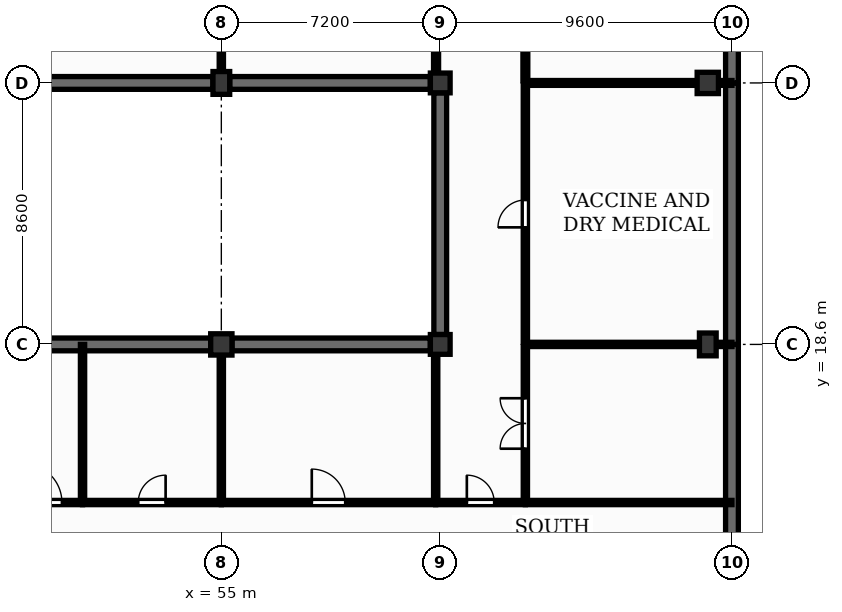
"""IFC4 building model, lengths in metres.
Left out: names, types, materials, properties, quantities, classifications, styles, units other than length and angle.
Written with IfcOpenShell. Run it as: python <this file> out.ifc"""

import sys

from ifc_helpers import new_model, si_unit, direction, frame, frame_2d, origin, origin_2d, place, context, subcontext, project, spatial, rectangle, extrude, element, fill, save


model = new_model("IFC4")
c1 = context("Model", 3, precision=1e-05, world=origin(), true_north=direction((0.0, 1.0)))
c2 = subcontext(c1, "Body", "Model", "MODEL_VIEW")
j1 = project(units=[si_unit("LENGTHUNIT", "METRE"), si_unit("PLANEANGLEUNIT", "RADIAN")], contexts=[c1])
p1 = place(None, origin())
s1 = spatial("IfcSite", under=j1, at=p1, CompositionType="ELEMENT")
p2 = place(p1, origin())
s2 = spatial("IfcBuilding", under=s1, at=p2, CompositionType="ELEMENT")
p3 = place(p2, frame((0.0, 0.0, -4.5)))
s3 = spatial("IfcBuildingStorey", under=s2, at=p3, CompositionType="ELEMENT", Elevation=-4.5)
p4 = place(p3, frame((55.0, 18.6, 0.0), z_axis=(0.0, 0.0, 1.0), x_axis=(1.0, 0.0, 0.0)))
e1 = element("IfcColumn", 1, at=p4, inside=s3, PredefinedType="COLUMN", context=c2, shape_type="SweptSolid", body=[
    extrude(rectangle(XDim=0.7, YDim=0.7, at=origin_2d()), origin(), (0.0, 0.0, 1.0), 4.2),
])
p5 = place(p3, frame((55.0, 27.2, 0.0), z_axis=(0.0, 0.0, 1.0), x_axis=(1.0, 0.0, 0.0)))
e2 = element("IfcColumn", 2, at=p5, inside=s3, PredefinedType="COLUMN", context=c2, shape_type="SweptSolid", body=[
    extrude(rectangle(XDim=0.55, YDim=0.75, at=origin_2d()), origin(), (0.0, 0.0, 1.0), 4.2),
])
for number, where, z_axis, x_axis in (
    (3, (62.2, 18.6, 0.0), (0.0, 0.0, 1.0), (1.0, 0.0, 0.0)),
    (4, (62.2, 27.2, 0.0), (0.0, 0.0, 1.0), (1.0, 0.0, 0.0)),
):
    element("IfcColumn", number, at=place(p3, frame(where, z_axis=z_axis, x_axis=x_axis)), inside=s3, PredefinedType="COLUMN", context=c2, shape_type="SweptSolid", body=[
        extrude(rectangle(XDim=0.65, YDim=0.65, at=origin_2d()), origin(), (0.0, 0.0, 1.0), 4.2),
    ])
p6 = place(p3, frame((71.0, 18.6, 0.0), z_axis=(0.0, 0.0, 1.0), x_axis=(1.0, 0.0, 0.0)))
e5 = element("IfcColumn", 5, at=p6, inside=s3, PredefinedType="COLUMN", context=c2, shape_type="SweptSolid", body=[
    extrude(rectangle(XDim=0.55, YDim=0.75, at=origin_2d()), origin(), (0.0, 0.0, 1.0), 4.2),
])
p7 = place(p3, frame((71.0, 27.2, 0.0), z_axis=(0.0, 0.0, 1.0), x_axis=(1.0, 0.0, 0.0)))
e6 = element("IfcColumn", 6, at=p7, inside=s3, PredefinedType="COLUMN", context=c2, shape_type="SweptSolid", body=[
    extrude(rectangle(XDim=0.7, YDim=0.7, at=origin_2d()), origin(), (0.0, 0.0, 1.0), 4.2),
])
p8 = place(p3, frame((48.125, 18.6, 0.0), z_axis=(0.0, 0.0, 1.0), x_axis=(1.0, 0.0, 0.0)))
e7 = element("IfcWall", 7, at=p8, inside=s3, PredefinedType="USERDEFINED", context=c2, shape_type="SweptSolid", body=[
    extrude(rectangle(XDim=6.525, YDim=0.42, at=frame_2d((3.262, 0.0))), origin(), (0.0, 0.0, 1.0), 4.2),
])
p9 = place(p3, frame((48.15, 27.2, 0.0), z_axis=(0.0, 0.0, 1.0), x_axis=(1.0, 0.0, 0.0)))
e8 = element("IfcWall", 8, at=p9, inside=s3, PredefinedType="USERDEFINED", context=c2, shape_type="SweptSolid", body=[
    extrude(rectangle(XDim=6.575, YDim=0.42, at=frame_2d((3.288, 0.0))), origin(), (0.0, 0.0, 1.0), 4.2),
])
p10 = place(p3, frame((55.35, 18.6, 0.0), z_axis=(0.0, 0.0, 1.0), x_axis=(1.0, 0.0, 0.0)))
e9 = element("IfcWall", 9, at=p10, inside=s3, PredefinedType="USERDEFINED", context=c2, shape_type="SweptSolid", body=[
    extrude(rectangle(XDim=6.525, YDim=0.42, at=frame_2d((3.262, 0.0))), origin(), (0.0, 0.0, 1.0), 4.2),
])
p11 = place(p3, frame((55.275, 27.2, 0.0), z_axis=(0.0, 0.0, 1.0), x_axis=(1.0, 0.0, 0.0)))
e10 = element("IfcWall", 10, at=p11, inside=s3, PredefinedType="USERDEFINED", context=c2, shape_type="SweptSolid", body=[
    extrude(rectangle(XDim=6.6, YDim=0.42, at=frame_2d((3.3, 0.0))), origin(), (0.0, 0.0, 1.0), 4.2),
])
p12 = place(p3, frame((71.795, 11.4, 0.0), z_axis=(0.0, 0.0, 1.0), x_axis=(0.0, 1.0, 0.0)))
e11 = element("IfcWall", 11, at=p12, inside=s3, PredefinedType="USERDEFINED", context=c2, shape_type="SweptSolid", body=[
    extrude(rectangle(XDim=7.2, YDim=0.42, at=frame_2d((3.6, 0.0))), origin(), (0.0, 0.0, 1.0), 4.2),
])
p13 = place(p3, frame((62.2, 18.925, 0.0), z_axis=(0.0, 0.0, 1.0), x_axis=(0.0, 1.0, 0.0)))
e12 = element("IfcWall", 12, at=p13, inside=s3, PredefinedType="USERDEFINED", context=c2, shape_type="SweptSolid", body=[
    extrude(rectangle(XDim=7.95, YDim=0.42, at=frame_2d((3.975, 0.0))), origin(), (0.0, 0.0, 1.0), 4.2),
])
p14 = place(p3, frame((71.795, 18.6, 0.0), z_axis=(0.0, 0.0, 1.0), x_axis=(0.0, 1.0, 0.0)))
e13 = element("IfcWall", 13, at=p14, inside=s3, PredefinedType="USERDEFINED", context=c2, shape_type="SweptSolid", body=[
    extrude(rectangle(XDim=8.6, YDim=0.42, at=frame_2d((4.3, 0.0))), origin(), (0.0, 0.0, 1.0), 4.2),
])
p15 = place(p3, frame((71.795, 27.2, 0.0), z_axis=(0.0, 0.0, 1.0), x_axis=(0.0, 1.0, 0.0)))
e14 = element("IfcWall", 14, at=p15, inside=s3, PredefinedType="USERDEFINED", context=c2, shape_type="SweptSolid", body=[
    extrude(rectangle(XDim=9.6, YDim=0.42, at=frame_2d((4.8, 0.0))), origin(), (0.0, 0.0, 1.0), 4.2),
])
p16 = place(p3, frame((47.8, 13.4, 0.0), z_axis=(0.0, 0.0, 1.0), x_axis=(1.0, 0.0, 0.0)))
e15 = element("IfcWall", 15, at=p16, inside=s3, PredefinedType="PARTITIONING", context=c2, shape_type="SweptSolid", body=[
    extrude(rectangle(XDim=2.635, YDim=0.14, at=frame_2d((1.317, 0.0))), origin(), (0.0, 0.0, 1.0), 4.08),
])
p17 = place(p16, frame((0.677, 0.0, 0.0)))
e16 = element("IfcOpeningElement", 16, at=p17, cuts=e15, PredefinedType="OPENING", context=c2, shape_type="SweptSolid", body=[
    extrude(rectangle(XDim=1.28, YDim=2.2, at=frame_2d((0.64, 1.1))), frame((0.0, 0.08, 0.0), z_axis=(0.0, -1.0, 0.0), x_axis=(1.0, 0.0, 0.0)), (0.0, 0.0, 1.0), 0.16),
])
p18 = place(p3, frame((50.435, 13.47, 0.0), z_axis=(0.0, 0.0, 1.0), x_axis=(0.0, 1.0, 0.0)))
e17 = element("IfcWall", 17, at=p18, inside=s3, PredefinedType="PARTITIONING", context=c2, shape_type="SweptSolid", body=[
    extrude(rectangle(XDim=5.13, YDim=0.14, at=frame_2d((2.565, 0.0))), origin(), (0.0, 0.0, 1.0), 4.08),
])
p19 = place(p3, frame((50.435, 13.4, 0.0), z_axis=(0.0, 0.0, 1.0), x_axis=(1.0, 0.0, 0.0)))
e18 = element("IfcWall", 18, at=p19, inside=s3, PredefinedType="PARTITIONING", context=c2, shape_type="SweptSolid", body=[
    extrude(rectangle(XDim=4.565, YDim=0.14, at=frame_2d((2.282, 0.0))), origin(), (0.0, 0.0, 1.0), 4.08),
])
p20 = place(p19, frame((1.833, 0.0, 0.0)))
e19 = element("IfcOpeningElement", 19, at=p20, cuts=e18, PredefinedType="OPENING", context=c2, shape_type="SweptSolid", body=[
    extrude(rectangle(XDim=0.9, YDim=2.1, at=frame_2d((0.45, 1.05))), frame((0.0, 0.08, 0.0), z_axis=(0.0, -1.0, 0.0), x_axis=(1.0, 0.0, 0.0)), (0.0, 0.0, 1.0), 0.16),
])
p21 = place(p3, frame((55.0, 13.47, 0.0), z_axis=(0.0, 0.0, 1.0), x_axis=(0.0, 1.0, 0.0)))
e20 = element("IfcWall", 20, at=p21, inside=s3, PredefinedType="PARTITIONING", context=c2, shape_type="SweptSolid", body=[
    extrude(rectangle(XDim=4.78, YDim=0.14, at=frame_2d((2.39, 0.0))), origin(), (0.0, 0.0, 1.0), 3.5),
])
p22 = place(p3, frame((55.0, 13.4, 0.0), z_axis=(0.0, 0.0, 1.0), x_axis=(1.0, 0.0, 0.0)))
e21 = element("IfcWall", 21, at=p22, inside=s3, PredefinedType="PARTITIONING", context=c2, shape_type="SweptSolid", body=[
    extrude(rectangle(XDim=7.05, YDim=0.14, at=frame_2d((3.525, 0.0))), origin(), (0.0, 0.0, 1.0), 4.08),
])
p23 = place(p22, frame((2.975, 0.0, 0.0)))
e22 = element("IfcOpeningElement", 22, at=p23, cuts=e21, PredefinedType="OPENING", context=c2, shape_type="SweptSolid", body=[
    extrude(rectangle(XDim=1.1, YDim=2.1, at=frame_2d((0.55, 1.05))), frame((0.0, 0.08, 0.0), z_axis=(0.0, -1.0, 0.0), x_axis=(1.0, 0.0, 0.0)), (0.0, 0.0, 1.0), 0.16),
])
p24 = place(p3, frame((55.0, 27.575, 0.0), z_axis=(0.0, 0.0, 1.0), x_axis=(0.0, 1.0, 0.0)))
e23 = element("IfcWall", 23, at=p24, inside=s3, PredefinedType="PARTITIONING", context=c2, shape_type="SweptSolid", body=[
    extrude(rectangle(XDim=2.755, YDim=0.14, at=frame_2d((1.377, 0.0))), origin(), (0.0, 0.0, 1.0), 3.4),
])
p25 = place(p3, frame((62.05, 13.47, 0.0), z_axis=(0.0, 0.0, 1.0), x_axis=(0.0, 1.0, 0.0)))
e24 = element("IfcWall", 24, at=p25, inside=s3, PredefinedType="PARTITIONING", context=c2, shape_type="SweptSolid", body=[
    extrude(rectangle(XDim=4.805, YDim=0.14, at=frame_2d((2.402, 0.0))), origin(), (0.0, 0.0, 1.0), 3.5),
])
p26 = place(p3, frame((62.05, 13.4, 0.0), z_axis=(0.0, 0.0, 1.0), x_axis=(1.0, 0.0, 0.0)))
e25 = element("IfcWall", 25, at=p26, inside=s3, PredefinedType="PARTITIONING", context=c2, shape_type="SweptSolid", body=[
    extrude(rectangle(XDim=2.95, YDim=0.14, at=frame_2d((1.475, 0.0))), origin(), (0.0, 0.0, 1.0), 4.08),
])
p27 = place(p26, frame((1.025, 0.0, 0.0)))
e26 = element("IfcOpeningElement", 26, at=p27, cuts=e25, PredefinedType="OPENING", context=c2, shape_type="SweptSolid", body=[
    extrude(rectangle(XDim=0.9, YDim=2.1, at=frame_2d((0.45, 1.05))), frame((0.0, 0.08, 0.0), z_axis=(0.0, -1.0, 0.0), x_axis=(1.0, 0.0, 0.0)), (0.0, 0.0, 1.0), 0.16),
])
p28 = place(p3, frame((62.05, 27.525, 0.0), z_axis=(0.0, 0.0, 1.0), x_axis=(0.0, 1.0, 0.0)))
e27 = element("IfcWall", 27, at=p28, inside=s3, PredefinedType="PARTITIONING", context=c2, shape_type="SweptSolid", body=[
    extrude(rectangle(XDim=2.805, YDim=0.14, at=frame_2d((1.403, 0.0))), origin(), (0.0, 0.0, 1.0), 3.4),
])
p29 = place(p3, frame((65.0, 13.47, 0.0), z_axis=(0.0, 0.0, 1.0), x_axis=(0.0, 1.0, 0.0)))
e28 = element("IfcWall", 28, at=p29, inside=s3, PredefinedType="PARTITIONING", context=c2, shape_type="SweptSolid", body=[
    extrude(rectangle(XDim=5.06, YDim=0.14, at=frame_2d((2.53, 0.0))), origin(), (0.0, 0.0, 1.0), 4.08),
])
p30 = place(p29, frame((1.7, 0.0, 0.0)))
e29 = element("IfcOpeningElement", 29, at=p30, cuts=e28, PredefinedType="OPENING", context=c2, shape_type="SweptSolid", body=[
    extrude(rectangle(XDim=1.66, YDim=2.3, at=frame_2d((0.83, 1.15))), frame((0.0, 0.08, 0.0), z_axis=(0.0, -1.0, 0.0), x_axis=(1.0, 0.0, 0.0)), (0.0, 0.0, 1.0), 0.16),
])
p31 = place(p3, frame((65.0, 13.4, 0.0), z_axis=(0.0, 0.0, 1.0), x_axis=(1.0, 0.0, 0.0)))
e30 = element("IfcWall", 30, at=p31, inside=s3, PredefinedType="PARTITIONING", context=c2, shape_type="SweptSolid", body=[
    extrude(rectangle(XDim=6.795, YDim=0.14, at=frame_2d((3.397, 0.0))), origin(), (0.0, 0.0, 1.0), 4.08),
])
p32 = place(p3, frame((65.0, 18.67, 0.0), z_axis=(0.0, 0.0, 1.0), x_axis=(0.0, 1.0, 0.0)))
e31 = element("IfcWall", 31, at=p32, inside=s3, PredefinedType="PARTITIONING", context=c2, shape_type="SweptSolid", body=[
    extrude(rectangle(XDim=8.46, YDim=0.14, at=frame_2d((4.23, 0.0))), origin(), (0.0, 0.0, 1.0), 4.08),
])
p33 = place(p32, frame((3.78, 0.0, 0.0)))
e32 = element("IfcOpeningElement", 32, at=p33, cuts=e31, PredefinedType="OPENING", context=c2, shape_type="SweptSolid", body=[
    extrude(rectangle(XDim=0.9, YDim=2.1, at=frame_2d((0.45, 1.05))), frame((0.0, 0.08, 0.0), z_axis=(0.0, -1.0, 0.0), x_axis=(1.0, 0.0, 0.0)), (0.0, 0.0, 1.0), 0.16),
])
p34 = place(p3, frame((65.0, 18.6, 0.0), z_axis=(0.0, 0.0, 1.0), x_axis=(1.0, 0.0, 0.0)))
e33 = element("IfcWall", 33, at=p34, inside=s3, PredefinedType="PARTITIONING", context=c2, shape_type="SweptSolid", body=[
    extrude(rectangle(XDim=5.725, YDim=0.14, at=frame_2d((2.863, 0.0))), origin(), (0.0, 0.0, 1.0), 3.4),
])
p35 = place(p3, frame((71.275, 18.6, 0.0), z_axis=(0.0, 0.0, 1.0), x_axis=(1.0, 0.0, 0.0)))
e34 = element("IfcWall", 34, at=p35, inside=s3, PredefinedType="PARTITIONING", context=c2, shape_type="SweptSolid", body=[
    extrude(rectangle(XDim=0.52, YDim=0.14, at=frame_2d((0.26, 0.0))), origin(), (0.0, 0.0, 1.0), 4.08),
])
p36 = place(p3, frame((65.0, 27.27, 0.0), z_axis=(0.0, 0.0, 1.0), x_axis=(0.0, 1.0, 0.0)))
e35 = element("IfcWall", 35, at=p36, inside=s3, PredefinedType="PARTITIONING", context=c2, shape_type="SweptSolid", body=[
    extrude(rectangle(XDim=3.06, YDim=0.16, at=frame_2d((1.53, 0.0))), origin(), (0.0, 0.0, 1.0), 4.08),
])
p37 = place(p36, frame((1.05, 0.0, 0.0)))
e36 = element("IfcOpeningElement", 36, at=p37, cuts=e35, PredefinedType="OPENING", context=c2, shape_type="SweptSolid", body=[
    extrude(rectangle(XDim=0.96, YDim=2.1, at=frame_2d((0.48, 1.05))), frame((0.0, 0.09, 0.0), z_axis=(0.0, -1.0, 0.0), x_axis=(1.0, 0.0, 0.0)), (0.0, 0.0, 1.0), 0.18),
])
p38 = place(p3, frame((65.0, 27.2, 0.0), z_axis=(0.0, 0.0, 1.0), x_axis=(1.0, 0.0, 0.0)))
e37 = element("IfcWall", 37, at=p38, inside=s3, PredefinedType="PARTITIONING", context=c2, shape_type="SweptSolid", body=[
    extrude(rectangle(XDim=5.65, YDim=0.16, at=frame_2d((2.825, 0.0))), origin(), (0.0, 0.0, 1.0), 3.4),
])
p39 = place(p3, frame((71.35, 27.2, 0.0), z_axis=(0.0, 0.0, 1.0), x_axis=(1.0, 0.0, 0.0)))
e38 = element("IfcWall", 38, at=p39, inside=s3, PredefinedType="PARTITIONING", context=c2, shape_type="SweptSolid", body=[
    extrude(rectangle(XDim=0.445, YDim=0.16, at=frame_2d((0.222, 0.0))), origin(), (0.0, 0.0, 1.0), 4.08),
])
p40 = place(p27, origin())
e39 = element("IfcDoor", 39, at=p40, inside=s3, OperationType="SINGLE_SWING_LEFT", PredefinedType="DOOR", context=c2, shape_type="SweptSolid", body=[
    extrude(rectangle(XDim=0.9, YDim=2.1, at=frame_2d((0.45, 1.05))), frame((0.0, 0.025, 0.0), z_axis=(0.0, -1.0, 0.0), x_axis=(1.0, 0.0, 0.0)), (0.0, 0.0, 1.0), 0.05),
])
fill(e26, e39)
p41 = place(p17, origin())
e40 = element("IfcDoor", 40, at=p41, inside=s3, OperationType="SINGLE_SWING_LEFT", PredefinedType="DOOR", context=c2, shape_type="SweptSolid", body=[
    extrude(rectangle(XDim=1.28, YDim=2.2, at=frame_2d((0.64, 1.1))), frame((0.0, 0.025, 0.0), z_axis=(0.0, -1.0, 0.0), x_axis=(1.0, 0.0, 0.0)), (0.0, 0.0, 1.0), 0.05),
])
fill(e16, e40)
p42 = place(p20, origin())
e41 = element("IfcDoor", 41, at=p42, inside=s3, OperationType="SINGLE_SWING_RIGHT", PredefinedType="DOOR", context=c2, shape_type="SweptSolid", body=[
    extrude(rectangle(XDim=0.9, YDim=2.1, at=frame_2d((0.45, 1.05))), frame((0.0, 0.025, 0.0), z_axis=(0.0, -1.0, 0.0), x_axis=(1.0, 0.0, 0.0)), (0.0, 0.0, 1.0), 0.05),
])
fill(e19, e41)
p43 = place(p23, origin())
e42 = element("IfcDoor", 42, at=p43, inside=s3, OperationType="SINGLE_SWING_LEFT", PredefinedType="DOOR", context=c2, shape_type="SweptSolid", body=[
    extrude(rectangle(XDim=1.1, YDim=2.1, at=frame_2d((0.55, 1.05))), frame((0.0, 0.025, 0.0), z_axis=(0.0, -1.0, 0.0), x_axis=(1.0, 0.0, 0.0)), (0.0, 0.0, 1.0), 0.05),
])
fill(e22, e42)
p44 = place(p30, origin())
e43 = element("IfcDoor", 43, at=p44, inside=s3, OperationType="DOUBLE_DOOR_SINGLE_SWING", PredefinedType="DOOR", context=c2, shape_type="SweptSolid", body=[
    extrude(rectangle(XDim=1.66, YDim=2.3, at=frame_2d((0.83, 1.15))), frame((0.0, 0.025, 0.0), z_axis=(0.0, -1.0, 0.0), x_axis=(1.0, 0.0, 0.0)), (0.0, 0.0, 1.0), 0.05),
])
fill(e29, e43)
p45 = place(p33, origin())
e44 = element("IfcDoor", 44, at=p45, inside=s3, OperationType="SINGLE_SWING_LEFT", PredefinedType="DOOR", context=c2, shape_type="SweptSolid", body=[
    extrude(rectangle(XDim=0.9, YDim=2.1, at=frame_2d((0.45, 1.05))), frame((0.0, 0.025, 0.0), z_axis=(0.0, -1.0, 0.0), x_axis=(1.0, 0.0, 0.0)), (0.0, 0.0, 1.0), 0.05),
])
fill(e32, e44)
save(model, sys.argv[1])
